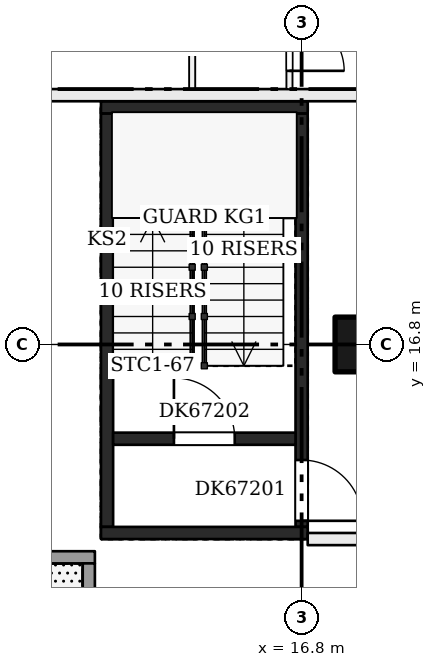
"""IFC4 building model, lengths in metres.
Left out: names, types, materials, properties, quantities, classifications, styles, units other than length and angle.
Written with IfcOpenShell. Run it as: python <this file> out.ifc"""

import sys

from ifc_helpers import new_model, si_unit, direction, frame, frame_2d, origin, origin_2d, place, context, subcontext, project, spatial, rectangle, extrude, element, fill, save


model = new_model("IFC4")
c1 = context("Model", 3, precision=1e-05, world=origin(), true_north=direction((0.0, 1.0)))
c2 = subcontext(c1, "Body", "Model", "MODEL_VIEW")
j1 = project(units=[si_unit("LENGTHUNIT", "METRE"), si_unit("PLANEANGLEUNIT", "RADIAN")], contexts=[c1])
p1 = place(None, origin())
s1 = spatial("IfcSite", under=j1, at=p1, CompositionType="ELEMENT")
p2 = place(p1, origin())
s2 = spatial("IfcBuilding", under=s1, at=p2, CompositionType="ELEMENT")
p3 = place(p2, frame((0.0, 0.0, 256.2)))
s3 = spatial("IfcBuildingStorey", under=s2, at=p3, CompositionType="ELEMENT", Elevation=256.2)
p4 = place(p3, frame((17.8, 16.8, 0.0), z_axis=(0.0, 0.0, 1.0), x_axis=(1.0, 0.0, 0.0)))
e1 = element("IfcColumn", 1, at=p4, inside=s3, PredefinedType="COLUMN", context=c2, shape_type="SweptSolid", body=[
    extrude(rectangle(XDim=0.9, YDim=0.9, at=origin_2d()), origin(), (0.0, 0.0, 1.0), 3.22),
])
p5 = place(p3, frame((13.6, 13.8, 0.0), z_axis=(0.0, 0.0, 1.0), x_axis=(0.0, 1.0, 0.0)))
e2 = element("IfcWall", 2, at=p5, inside=s3, PredefinedType="SHEAR", context=c2, shape_type="SweptSolid", body=[
    extrude(rectangle(XDim=6.8, YDim=0.2, at=frame_2d((3.4, 0.0))), origin(), (0.0, 0.0, 1.0), 3.22),
])
p6 = place(p3, frame((16.8, 13.8, 0.0), z_axis=(0.0, 0.0, 1.0), x_axis=(0.0, 1.0, 0.0)))
e3 = element("IfcWall", 3, at=p6, inside=s3, PredefinedType="SHEAR", context=c2, shape_type="SweptSolid", body=[
    extrude(rectangle(XDim=6.8, YDim=0.2, at=frame_2d((3.4, 0.0))), origin(), (0.0, 0.0, 1.0), 3.22),
])
p7 = place(p6, frame((0.1, 0.0, 0.0)))
e4 = element("IfcOpeningElement", 4, at=p7, cuts=e3, PredefinedType="OPENING", context=c2, shape_type="SweptSolid", body=[
    extrude(rectangle(XDim=1.0, YDim=2.1, at=frame_2d((0.5, 1.05))), frame((0.0, 0.11, 0.0), z_axis=(0.0, -1.0, 0.0), x_axis=(1.0, 0.0, 0.0)), (0.0, 0.0, 1.0), 0.22),
])
for number, where, z_axis, x_axis in (
    (5, (13.5, 13.7, 0.0), (0.0, 0.0, 1.0), (1.0, 0.0, 0.0)),
    (6, (13.5, 20.7, 0.0), (0.0, 0.0, 1.0), (1.0, 0.0, 0.0)),
):
    element("IfcWall", number, at=place(p3, frame(where, z_axis=z_axis, x_axis=x_axis)), inside=s3, PredefinedType="SHEAR", context=c2, shape_type="SweptSolid", body=[
        extrude(rectangle(XDim=3.4, YDim=0.2, at=frame_2d((1.7, 0.0))), origin(), (0.0, 0.0, 1.0), 3.22),
    ])
p8 = place(p3, frame((13.7, 15.25, 0.0), z_axis=(0.0, 0.0, 1.0), x_axis=(1.0, 0.0, 0.0)))
e7 = element("IfcWall", 7, at=p8, inside=s3, PredefinedType="SHEAR", context=c2, shape_type="SweptSolid", body=[
    extrude(rectangle(XDim=3.0, YDim=0.2, at=frame_2d((1.5, 0.0))), origin(), (0.0, 0.0, 1.0), 3.22),
])
p9 = place(p8, frame((1.0, 0.0, 0.0)))
e8 = element("IfcOpeningElement", 8, at=p9, cuts=e7, PredefinedType="OPENING", context=c2, shape_type="SweptSolid", body=[
    extrude(rectangle(XDim=1.0, YDim=2.1, at=frame_2d((0.5, 1.05))), frame((0.0, 0.11, 0.0), z_axis=(0.0, -1.0, 0.0), x_axis=(1.0, 0.0, 0.0)), (0.0, 0.0, 1.0), 0.22),
])
p10 = place(p3, frame((16.9, 13.6, 0.0), z_axis=(0.0, 0.0, 1.0), x_axis=(1.0, 0.0, 0.0)))
e9 = element("IfcWall", 9, at=p10, inside=s3, PredefinedType="PARTITIONING", context=c2, shape_type="SweptSolid", body=[
    extrude(rectangle(XDim=4.2, YDim=0.2, at=frame_2d((2.1, 0.0))), origin(), (0.0, 0.0, 1.0), 3.22),
])
p11 = place(p10, frame((1.6, 0.0, 0.0)))
e10 = element("IfcOpeningElement", 10, at=p11, cuts=e9, PredefinedType="OPENING", context=c2, shape_type="SweptSolid", body=[
    extrude(rectangle(XDim=1.0, YDim=2.1, at=frame_2d((0.5, 1.05))), frame((0.0, 0.11, 0.0), z_axis=(0.0, -1.0, 0.0), x_axis=(1.0, 0.0, 0.0)), (0.0, 0.0, 1.0), 0.22),
])
p12 = place(p3, frame((10.9, 20.9, 0.0), z_axis=(0.0, 0.0, 1.0), x_axis=(1.0, 0.0, 0.0)))
e11 = element("IfcWall", 11, at=p12, inside=s3, PredefinedType="PARTITIONING", context=c2, shape_type="SweptSolid", body=[
    extrude(rectangle(XDim=8.3, YDim=0.2, at=frame_2d((4.15, 0.0))), origin(), (0.0, 0.0, 1.0), 3.22),
])
p13 = place(p3, frame((15.0, 21.0, 0.0), z_axis=(0.0, 0.0, 1.0), x_axis=(0.0, 1.0, 0.0)))
e12 = element("IfcWall", 12, at=p13, inside=s3, PredefinedType="PARTITIONING", context=c2, shape_type="SweptSolid", body=[
    extrude(rectangle(XDim=19.0, YDim=0.1, at=frame_2d((9.5, 0.0))), origin(), (0.0, 0.0, 1.0), 3.22),
])
p14 = place(p13, frame((1.6, 0.0, 0.0)))
e13 = element("IfcOpeningElement", 13, at=p14, cuts=e12, PredefinedType="OPENING", context=c2, shape_type="SweptSolid", body=[
    extrude(rectangle(XDim=0.9, YDim=2.1, at=frame_2d((0.45, 1.05))), frame((0.0, 0.06, 0.0), z_axis=(0.0, -1.0, 0.0), x_axis=(1.0, 0.0, 0.0)), (0.0, 0.0, 1.0), 0.12),
])
p15 = place(p13, frame((5.8, 0.0, 0.0)))
e14 = element("IfcOpeningElement", 14, at=p15, cuts=e12, PredefinedType="OPENING", context=c2, shape_type="SweptSolid", body=[
    extrude(rectangle(XDim=0.9, YDim=2.1, at=frame_2d((0.45, 1.05))), frame((0.0, 0.06, 0.0), z_axis=(0.0, -1.0, 0.0), x_axis=(1.0, 0.0, 0.0)), (0.0, 0.0, 1.0), 0.12),
])
p16 = place(p13, frame((13.3, 0.0, 0.0)))
e15 = element("IfcOpeningElement", 15, at=p16, cuts=e12, PredefinedType="OPENING", context=c2, shape_type="SweptSolid", body=[
    extrude(rectangle(XDim=0.9, YDim=2.1, at=frame_2d((0.45, 1.05))), frame((0.0, 0.06, 0.0), z_axis=(0.0, -1.0, 0.0), x_axis=(1.0, 0.0, 0.0)), (0.0, 0.0, 1.0), 0.12),
])
p17 = place(p3, frame((16.6, 21.0, 0.0), z_axis=(0.0, 0.0, 1.0), x_axis=(0.0, 1.0, 0.0)))
e16 = element("IfcWall", 16, at=p17, inside=s3, PredefinedType="PARTITIONING", context=c2, shape_type="SweptSolid", body=[
    extrude(rectangle(XDim=19.0, YDim=0.1, at=frame_2d((9.5, 0.0))), origin(), (0.0, 0.0, 1.0), 3.22),
])
p18 = place(p17, frame((2.6, 0.0, 0.0)))
e17 = element("IfcOpeningElement", 17, at=p18, cuts=e16, PredefinedType="OPENING", context=c2, shape_type="SweptSolid", body=[
    extrude(rectangle(XDim=0.9, YDim=2.1, at=frame_2d((0.45, 1.05))), frame((0.0, 0.06, 0.0), z_axis=(0.0, -1.0, 0.0), x_axis=(1.0, 0.0, 0.0)), (0.0, 0.0, 1.0), 0.12),
])
p19 = place(p17, frame((0.3, 0.0, 0.0)))
e18 = element("IfcOpeningElement", 18, at=p19, cuts=e16, PredefinedType="OPENING", context=c2, shape_type="SweptSolid", body=[
    extrude(rectangle(XDim=0.9, YDim=2.1, at=frame_2d((0.45, 1.05))), frame((0.0, 0.06, 0.0), z_axis=(0.0, -1.0, 0.0), x_axis=(1.0, 0.0, 0.0)), (0.0, 0.0, 1.0), 0.12),
])
p20 = place(p17, frame((7.7, 0.0, 0.0)))
e19 = element("IfcOpeningElement", 19, at=p20, cuts=e16, PredefinedType="OPENING", context=c2, shape_type="SweptSolid", body=[
    extrude(rectangle(XDim=0.9, YDim=2.1, at=frame_2d((0.45, 1.05))), frame((0.0, 0.06, 0.0), z_axis=(0.0, -1.0, 0.0), x_axis=(1.0, 0.0, 0.0)), (0.0, 0.0, 1.0), 0.12),
])
p21 = place(p17, frame((13.3, 0.0, 0.0)))
e20 = element("IfcOpeningElement", 20, at=p21, cuts=e16, PredefinedType="OPENING", context=c2, shape_type="SweptSolid", body=[
    extrude(rectangle(XDim=0.9, YDim=2.1, at=frame_2d((0.45, 1.05))), frame((0.0, 0.06, 0.0), z_axis=(0.0, -1.0, 0.0), x_axis=(1.0, 0.0, 0.0)), (0.0, 0.0, 1.0), 0.12),
])
p22 = place(p17, frame((16.7, 0.0, 0.0)))
e21 = element("IfcOpeningElement", 21, at=p22, cuts=e16, PredefinedType="OPENING", context=c2, shape_type="SweptSolid", body=[
    extrude(rectangle(XDim=0.9, YDim=2.1, at=frame_2d((0.45, 1.05))), frame((0.0, 0.06, 0.0), z_axis=(0.0, -1.0, 0.0), x_axis=(1.0, 0.0, 0.0)), (0.0, 0.0, 1.0), 0.12),
])
p23 = place(p3, frame((10.8, 13.3, 0.0), z_axis=(0.0, 0.0, 1.0), x_axis=(1.0, 0.0, 0.0)))
e22 = element("IfcWall", 22, at=p23, inside=s3, PredefinedType="SOLIDWALL", context=c2, shape_type="SweptSolid", body=[
    extrude(rectangle(XDim=2.6, YDim=0.2, at=frame_2d((1.3, 0.0))), origin(), (0.0, 0.0, 1.0), 3.22),
])
p24 = place(p3, frame((13.3, 13.2, 0.0), z_axis=(0.0, 0.0, 1.0), x_axis=(0.0, -1.0, 0.0)))
e23 = element("IfcWall", 23, at=p24, inside=s3, PredefinedType="SOLIDWALL", context=c2, shape_type="SweptSolid", body=[
    extrude(rectangle(XDim=2.2, YDim=0.2, at=frame_2d((1.1, 0.0))), origin(), (0.0, 0.0, 1.0), 3.22),
])
p25 = place(p7, frame((1.0, 0.0, 0.0), z_axis=(0.0, 0.0, 1.0), x_axis=(-1.0, 0.0, 0.0)))
e24 = element("IfcDoor", 24, at=p25, inside=s3, OperationType="SINGLE_SWING_RIGHT", PredefinedType="DOOR", context=c2, shape_type="SweptSolid", body=[
    extrude(rectangle(XDim=1.0, YDim=2.1, at=frame_2d((0.5, 1.05))), frame((0.0, 0.025, 0.0), z_axis=(0.0, -1.0, 0.0), x_axis=(1.0, 0.0, 0.0)), (0.0, 0.0, 1.0), 0.05),
])
fill(e4, e24)
p26 = place(p9, origin())
e25 = element("IfcDoor", 25, at=p26, inside=s3, OperationType="SINGLE_SWING_LEFT", PredefinedType="DOOR", context=c2, shape_type="SweptSolid", body=[
    extrude(rectangle(XDim=1.0, YDim=2.1, at=frame_2d((0.5, 1.05))), frame((0.0, 0.025, 0.0), z_axis=(0.0, -1.0, 0.0), x_axis=(1.0, 0.0, 0.0)), (0.0, 0.0, 1.0), 0.05),
])
fill(e8, e25)
p27 = place(p19, frame((0.9, 0.0, 0.0), z_axis=(0.0, 0.0, 1.0), x_axis=(-1.0, 0.0, 0.0)))
e26 = element("IfcDoor", 26, at=p27, inside=s3, OperationType="SINGLE_SWING_RIGHT", PredefinedType="DOOR", context=c2, shape_type="SweptSolid", body=[
    extrude(rectangle(XDim=0.9, YDim=2.1, at=frame_2d((0.45, 1.05))), frame((0.0, 0.025, 0.0), z_axis=(0.0, -1.0, 0.0), x_axis=(1.0, 0.0, 0.0)), (0.0, 0.0, 1.0), 0.05),
])
fill(e18, e26)
save(model, sys.argv[1])
